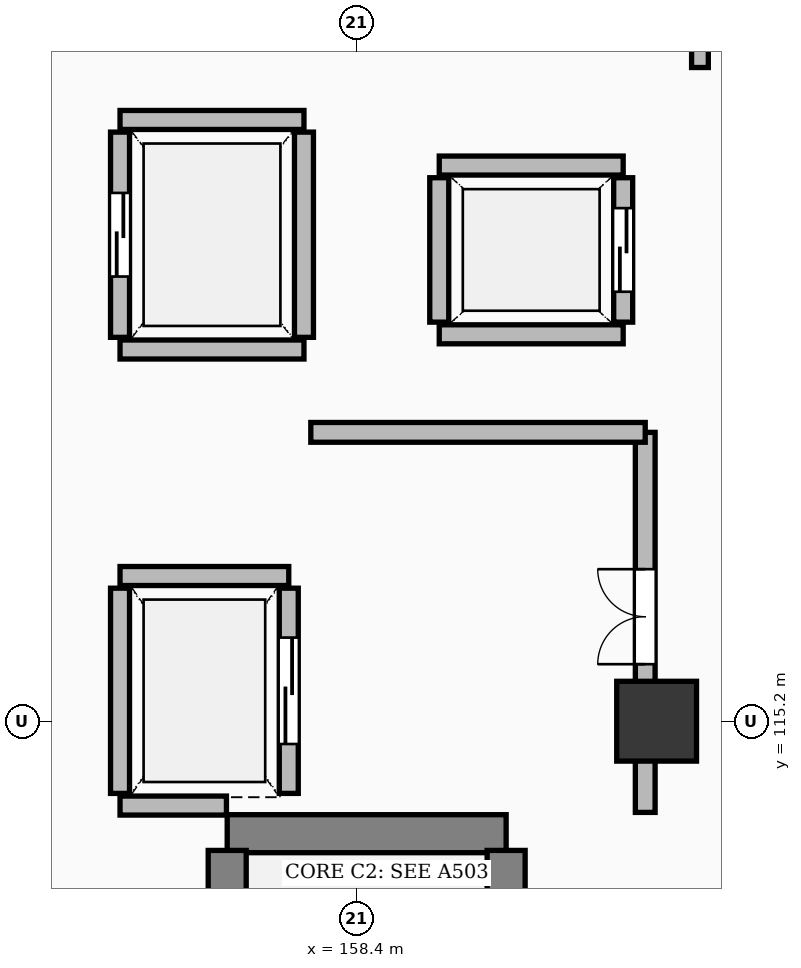
"""IFC4 building model, lengths in metres.
Left out: names, types, materials, properties, quantities, classifications, styles, units other than length and angle.
Written with IfcOpenShell. Run it as: python <this file> out.ifc"""

import sys

from ifc_helpers import new_model, si_unit, direction, frame, frame_2d, origin, origin_2d, place, context, subcontext, project, spatial, rectangle, extrude, element, fill, save


model = new_model("IFC4")
c1 = context("Model", 3, precision=1e-05, world=origin(), true_north=direction((0.0, 1.0)))
c2 = subcontext(c1, "Body", "Model", "MODEL_VIEW")
j1 = project(units=[si_unit("LENGTHUNIT", "METRE"), si_unit("PLANEANGLEUNIT", "RADIAN")], contexts=[c1])
p1 = place(None, origin())
s1 = spatial("IfcSite", under=j1, at=p1, CompositionType="ELEMENT")
p2 = place(p1, origin())
s2 = spatial("IfcBuilding", under=s1, at=p2, CompositionType="ELEMENT")
p3 = place(p2, origin())
s3 = spatial("IfcBuildingStorey", under=s2, at=p3, CompositionType="ELEMENT", Elevation=0.0)
p4 = place(p3, frame((162.35, 115.2, 0.0), z_axis=(0.0, 0.0, 1.0), x_axis=(1.0, 0.0, 0.0)))
e1 = element("IfcColumn", 1, at=p4, inside=s3, PredefinedType="COLUMN", context=c2, shape_type="SweptSolid", body=[
    extrude(rectangle(XDim=1.05, YDim=1.05, at=origin_2d()), origin(), (0.0, 0.0, 1.0), 6.0),
])
p5 = place(p3, frame((156.7, 113.72, 0.0), z_axis=(0.0, 0.0, 1.0), x_axis=(1.0, 0.0, 0.0)))
e2 = element("IfcWall", 2, at=p5, inside=s3, PredefinedType="SHEAR", context=c2, shape_type="SweptSolid", body=[
    extrude(rectangle(XDim=3.67, YDim=0.5, at=frame_2d((1.835, 0.0))), origin(), (0.0, 0.0, 1.0), 5.7),
])
p6 = place(p3, frame((156.7, 103.0, 0.0), z_axis=(0.0, 0.0, 1.0), x_axis=(0.0, 1.0, 0.0)))
e3 = element("IfcWall", 3, at=p6, inside=s3, PredefinedType="SHEAR", context=c2, shape_type="SweptSolid", body=[
    extrude(rectangle(XDim=10.5, YDim=0.5, at=frame_2d((5.25, 0.0))), origin(), (0.0, 0.0, 1.0), 5.7),
])
p7 = place(p3, frame((160.37, 103.0, 0.0), z_axis=(0.0, 0.0, 1.0), x_axis=(0.0, 1.0, 0.0)))
e4 = element("IfcWall", 4, at=p7, inside=s3, PredefinedType="SHEAR", context=c2, shape_type="SweptSolid", body=[
    extrude(rectangle(XDim=10.5, YDim=0.5, at=frame_2d((5.25, 0.0))), origin(), (0.0, 0.0, 1.0), 5.7),
])
p8 = place(p7, frame((0.45, 0.0, 0.0)))
e5 = element("IfcOpeningElement", 5, at=p8, cuts=e4, PredefinedType="OPENING", context=c2, shape_type="SweptSolid", body=[
    extrude(rectangle(XDim=1.3, YDim=2.15, at=frame_2d((0.65, 1.075))), frame((0.0, 0.262, 0.0), z_axis=(0.0, -1.0, 0.0), x_axis=(1.0, 0.0, 0.0)), (0.0, 0.0, 1.0), 0.524),
])
p9 = place(p3, frame((155.29, 114.09, 0.0), z_axis=(0.0, 0.0, 1.0), x_axis=(1.0, 0.0, 0.0)))
e6 = element("IfcWall", 6, at=p9, inside=s3, PredefinedType="SOLIDWALL", context=c2, shape_type="SweptSolid", body=[
    extrude(rectangle(XDim=1.4, YDim=0.25, at=frame_2d((0.7, 0.0))), origin(), (0.0, 0.0, 1.0), 5.7),
])
p10 = place(p3, frame((155.29, 117.11, 0.0), z_axis=(0.0, 0.0, 1.0), x_axis=(1.0, 0.0, 0.0)))
e7 = element("IfcWall", 7, at=p10, inside=s3, PredefinedType="SOLIDWALL", context=c2, shape_type="SweptSolid", body=[
    extrude(rectangle(XDim=2.22, YDim=0.25, at=frame_2d((1.11, 0.0))), origin(), (0.0, 0.0, 1.0), 5.7),
])
p11 = place(p3, frame((155.29, 114.25, 0.0), z_axis=(0.0, 0.0, 1.0), x_axis=(0.0, 1.0, 0.0)))
e8 = element("IfcWall", 8, at=p11, inside=s3, PredefinedType="SOLIDWALL", context=c2, shape_type="SweptSolid", body=[
    extrude(rectangle(XDim=2.7, YDim=0.25, at=frame_2d((1.35, 0.0))), origin(), (0.0, 0.0, 1.0), 4.692),
])
p12 = place(p3, frame((157.51, 114.25, 0.0), z_axis=(0.0, 0.0, 1.0), x_axis=(0.0, 1.0, 0.0)))
e9 = element("IfcWall", 9, at=p12, inside=s3, PredefinedType="SOLIDWALL", context=c2, shape_type="SweptSolid", body=[
    extrude(rectangle(XDim=2.7, YDim=0.25, at=frame_2d((1.35, 0.0))), origin(), (0.0, 0.0, 1.0), 4.692),
])
p13 = place(p12, frame((0.65, 0.0, 0.0)))
e10 = element("IfcOpeningElement", 10, at=p13, cuts=e9, PredefinedType="OPENING", context=c2, shape_type="SweptSolid", body=[
    extrude(rectangle(XDim=1.4, YDim=2.3, at=frame_2d((0.7, 1.15))), frame((0.0, 0.137, 0.0), z_axis=(0.0, -1.0, 0.0), x_axis=(1.0, 0.0, 0.0)), (0.0, 0.0, 1.0), 0.274),
])
for number, where, z_axis, x_axis in (
    (11, (159.49, 120.29, 0.0), (0.0, 0.0, 1.0), (1.0, 0.0, 0.0)),
    (12, (159.49, 122.51, 0.0), (0.0, 0.0, 1.0), (1.0, 0.0, 0.0)),
):
    element("IfcWall", number, at=place(p3, frame(where, z_axis=z_axis, x_axis=x_axis)), inside=s3, PredefinedType="SOLIDWALL", context=c2, shape_type="SweptSolid", body=[
        extrude(rectangle(XDim=2.42, YDim=0.25, at=frame_2d((1.21, 0.0))), origin(), (0.0, 0.0, 1.0), 5.7),
    ])
p14 = place(p3, frame((159.49, 120.45, 0.0), z_axis=(0.0, 0.0, 1.0), x_axis=(0.0, 1.0, 0.0)))
e13 = element("IfcWall", 13, at=p14, inside=s3, PredefinedType="SOLIDWALL", context=c2, shape_type="SweptSolid", body=[
    extrude(rectangle(XDim=1.9, YDim=0.25, at=frame_2d((0.95, 0.0))), origin(), (0.0, 0.0, 1.0), 5.7),
])
p15 = place(p3, frame((161.91, 120.45, 0.0), z_axis=(0.0, 0.0, 1.0), x_axis=(0.0, 1.0, 0.0)))
e14 = element("IfcWall", 14, at=p15, inside=s3, PredefinedType="SOLIDWALL", context=c2, shape_type="SweptSolid", body=[
    extrude(rectangle(XDim=1.9, YDim=0.25, at=frame_2d((0.95, 0.0))), origin(), (0.0, 0.0, 1.0), 5.7),
])
p16 = place(p15, frame((0.4, 0.0, 0.0)))
e15 = element("IfcOpeningElement", 15, at=p16, cuts=e14, PredefinedType="OPENING", context=c2, shape_type="SweptSolid", body=[
    extrude(rectangle(XDim=1.1, YDim=2.2, at=frame_2d((0.55, 1.1))), frame((0.0, 0.137, 0.0), z_axis=(0.0, -1.0, 0.0), x_axis=(1.0, 0.0, 0.0)), (0.0, 0.0, 1.0), 0.274),
])
for number, where, z_axis, x_axis in (
    (16, (155.29, 120.09, 0.0), (0.0, 0.0, 1.0), (1.0, 0.0, 0.0)),
    (17, (155.29, 123.11, 0.0), (0.0, 0.0, 1.0), (1.0, 0.0, 0.0)),
):
    element("IfcWall", number, at=place(p3, frame(where, z_axis=z_axis, x_axis=x_axis)), inside=s3, PredefinedType="SOLIDWALL", context=c2, shape_type="SweptSolid", body=[
        extrude(rectangle(XDim=2.42, YDim=0.25, at=frame_2d((1.21, 0.0))), origin(), (0.0, 0.0, 1.0), 5.7),
    ])
p17 = place(p3, frame((155.29, 120.25, 0.0), z_axis=(0.0, 0.0, 1.0), x_axis=(0.0, 1.0, 0.0)))
e18 = element("IfcWall", 18, at=p17, inside=s3, PredefinedType="SOLIDWALL", context=c2, shape_type="SweptSolid", body=[
    extrude(rectangle(XDim=2.7, YDim=0.25, at=frame_2d((1.35, 0.0))), origin(), (0.0, 0.0, 1.0), 5.7),
])
p18 = place(p17, frame((0.8, 0.0, 0.0)))
e19 = element("IfcOpeningElement", 19, at=p18, cuts=e18, PredefinedType="OPENING", context=c2, shape_type="SweptSolid", body=[
    extrude(rectangle(XDim=1.1, YDim=2.2, at=frame_2d((0.55, 1.1))), frame((0.0, 0.137, 0.0), z_axis=(0.0, -1.0, 0.0), x_axis=(1.0, 0.0, 0.0)), (0.0, 0.0, 1.0), 0.274),
])
p19 = place(p3, frame((157.71, 120.25, 0.0), z_axis=(0.0, 0.0, 1.0), x_axis=(0.0, 1.0, 0.0)))
e20 = element("IfcWall", 20, at=p19, inside=s3, PredefinedType="SOLIDWALL", context=c2, shape_type="SweptSolid", body=[
    extrude(rectangle(XDim=2.7, YDim=0.25, at=frame_2d((1.35, 0.0))), origin(), (0.0, 0.0, 1.0), 5.7),
])
p20 = place(p3, frame((162.2, 114.0, 0.0), z_axis=(0.0, 0.0, 1.0), x_axis=(0.0, 1.0, 0.0)))
e21 = element("IfcWall", 21, at=p20, inside=s3, PredefinedType="SOLIDWALL", context=c2, shape_type="SweptSolid", body=[
    extrude(rectangle(XDim=5.0, YDim=0.26, at=frame_2d((2.5, 0.0))), origin(), (0.0, 0.0, 1.0), 4.692),
])
p21 = place(p20, frame((1.95, 0.0, 0.0)))
e22 = element("IfcOpeningElement", 22, at=p21, cuts=e21, PredefinedType="OPENING", context=c2, shape_type="SweptSolid", body=[
    extrude(rectangle(XDim=1.25, YDim=2.15, at=frame_2d((0.625, 1.075))), frame((0.0, 0.142, 0.0), z_axis=(0.0, -1.0, 0.0), x_axis=(1.0, 0.0, 0.0)), (0.0, 0.0, 1.0), 0.284),
])
p22 = place(p3, frame((157.8, 119.0, 0.0), z_axis=(0.0, 0.0, 1.0), x_axis=(1.0, 0.0, 0.0)))
e23 = element("IfcWall", 23, at=p22, inside=s3, PredefinedType="SOLIDWALL", context=c2, shape_type="SweptSolid", body=[
    extrude(rectangle(XDim=4.4, YDim=0.26, at=frame_2d((2.2, 0.0))), origin(), (0.0, 0.0, 1.0), 4.692),
])
p23 = place(p3, frame((162.92, 123.8, 0.0), z_axis=(0.0, 0.0, 1.0), x_axis=(0.0, 1.0, 0.0)))
e24 = element("IfcWall", 24, at=p23, inside=s3, PredefinedType="PARTITIONING", context=c2, shape_type="SweptSolid", body=[
    extrude(rectangle(XDim=1.85, YDim=0.22, at=frame_2d((0.925, 0.0))), origin(), (0.0, 0.0, 1.0), 4.942),
])
p24 = place(p13, origin())
e25 = element("IfcDoor", 25, at=p24, inside=s3, OperationType="SLIDING_TO_LEFT", PredefinedType="DOOR", context=c2, shape_type="SweptSolid", body=[
    extrude(rectangle(XDim=1.4, YDim=2.3, at=frame_2d((0.7, 1.15))), frame((0.0, 0.025, 0.0), z_axis=(0.0, -1.0, 0.0), x_axis=(1.0, 0.0, 0.0)), (0.0, 0.0, 1.0), 0.05),
])
fill(e10, e25)
p25 = place(p16, origin())
e26 = element("IfcDoor", 26, at=p25, inside=s3, OperationType="SLIDING_TO_LEFT", PredefinedType="DOOR", context=c2, shape_type="SweptSolid", body=[
    extrude(rectangle(XDim=1.1, YDim=2.2, at=frame_2d((0.55, 1.1))), frame((0.0, 0.025, 0.0), z_axis=(0.0, -1.0, 0.0), x_axis=(1.0, 0.0, 0.0)), (0.0, 0.0, 1.0), 0.05),
])
fill(e15, e26)
p26 = place(p18, origin())
e27 = element("IfcDoor", 27, at=p26, inside=s3, OperationType="SLIDING_TO_LEFT", PredefinedType="DOOR", context=c2, shape_type="SweptSolid", body=[
    extrude(rectangle(XDim=1.1, YDim=2.2, at=frame_2d((0.55, 1.1))), frame((0.0, 0.025, 0.0), z_axis=(0.0, -1.0, 0.0), x_axis=(1.0, 0.0, 0.0)), (0.0, 0.0, 1.0), 0.05),
])
fill(e19, e27)
p27 = place(p21, origin())
e28 = element("IfcDoor", 28, at=p27, inside=s3, OperationType="DOUBLE_DOOR_SINGLE_SWING", PredefinedType="DOOR", context=c2, shape_type="SweptSolid", body=[
    extrude(rectangle(XDim=1.25, YDim=2.15, at=frame_2d((0.625, 1.075))), frame((0.0, 0.025, 0.0), z_axis=(0.0, -1.0, 0.0), x_axis=(1.0, 0.0, 0.0)), (0.0, 0.0, 1.0), 0.05),
])
fill(e22, e28)
save(model, sys.argv[1])
